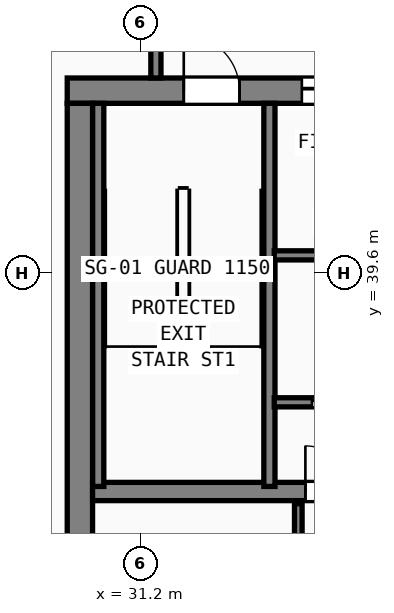
"""IFC4 building model, lengths in metres.
Left out: names, types, materials, properties, quantities, classifications, styles, units other than length and angle.
Written with IfcOpenShell. Run it as: python <this file> out.ifc"""

import sys

from ifc_helpers import new_model, si_unit, direction, frame, frame_2d, origin, place, context, subcontext, project, spatial, rectangle, extrude, element, fill, save


model = new_model("IFC4")
c1 = context("Model", 3, precision=1e-05, world=origin(), true_north=direction((0.0, 1.0)))
c2 = subcontext(c1, "Body", "Model", "MODEL_VIEW")
j1 = project(units=[si_unit("LENGTHUNIT", "METRE"), si_unit("PLANEANGLEUNIT", "RADIAN")], contexts=[c1])
p1 = place(None, origin())
s1 = spatial("IfcSite", under=j1, at=p1, CompositionType="ELEMENT")
p2 = place(p1, origin())
s2 = spatial("IfcBuilding", under=s1, at=p2, CompositionType="ELEMENT")
p3 = place(p2, frame((0.0, 0.0, 282.2)))
s3 = spatial("IfcBuildingStorey", under=s2, at=p3, CompositionType="ELEMENT", Elevation=282.2)
p4 = place(p3, frame((29.75, 43.2, 0.0), z_axis=(0.0, 0.0, 1.0), x_axis=(1.0, 0.0, 0.0)))
e1 = element("IfcWall", 1, at=p4, inside=s3, PredefinedType="SHEAR", context=c2, shape_type="SweptSolid", body=[
    extrude(rectangle(XDim=17.3, YDim=0.5, at=frame_2d((8.65, 0.0))), origin(), (0.0, 0.0, 1.0), 3.72),
])
p5 = place(p4, frame((2.3, 0.0, 0.0)))
e2 = element("IfcOpeningElement", 2, at=p5, cuts=e1, PredefinedType="OPENING", context=c2, shape_type="SweptSolid", body=[
    extrude(rectangle(XDim=1.1, YDim=2.15, at=frame_2d((0.55, 1.075))), frame((0.0, 0.26, 0.0), z_axis=(0.0, -1.0, 0.0), x_axis=(1.0, 0.0, 0.0)), (0.0, 0.0, 1.0), 0.52),
])
p6 = place(p4, frame((7.41, 0.0, 0.0)))
e3 = element("IfcOpeningElement", 3, at=p6, cuts=e1, PredefinedType="OPENING", context=c2, shape_type="SweptSolid", body=[
    extrude(rectangle(XDim=1.1, YDim=2.15, at=frame_2d((0.55, 1.075))), frame((0.0, 0.26, 0.0), z_axis=(0.0, -1.0, 0.0), x_axis=(1.0, 0.0, 0.0)), (0.0, 0.0, 1.0), 0.52),
])
p7 = place(p4, frame((13.5, 0.0, 0.0)))
e4 = element("IfcOpeningElement", 4, at=p7, cuts=e1, PredefinedType="OPENING", context=c2, shape_type="SweptSolid", body=[
    extrude(rectangle(XDim=1.1, YDim=2.15, at=frame_2d((0.55, 1.075))), frame((0.0, 0.26, 0.0), z_axis=(0.0, -1.0, 0.0), x_axis=(1.0, 0.0, 0.0)), (0.0, 0.0, 1.0), 0.52),
])
p8 = place(p4, frame((4.63, 0.0, 0.0)))
e5 = element("IfcOpeningElement", 5, at=p8, cuts=e1, PredefinedType="OPENING", context=c2, shape_type="SweptSolid", body=[
    extrude(rectangle(XDim=1.1, YDim=2.2, at=frame_2d((0.55, 1.1))), frame((0.0, 0.26, 0.0), z_axis=(0.0, -1.0, 0.0), x_axis=(1.0, 0.0, 0.0)), (0.0, 0.0, 1.0), 0.52),
])
p9 = place(p4, frame((10.99, 0.0, 0.0)))
e6 = element("IfcOpeningElement", 6, at=p9, cuts=e1, PredefinedType="OPENING", context=c2, shape_type="SweptSolid", body=[
    extrude(rectangle(XDim=1.1, YDim=2.2, at=frame_2d((0.55, 1.1))), frame((0.0, 0.26, 0.0), z_axis=(0.0, -1.0, 0.0), x_axis=(1.0, 0.0, 0.0)), (0.0, 0.0, 1.0), 0.52),
])
p10 = place(p3, frame((30.0, 32.8, 0.0), z_axis=(0.0, 0.0, 1.0), x_axis=(0.0, 1.0, 0.0)))
e7 = element("IfcWall", 7, at=p10, inside=s3, PredefinedType="SHEAR", context=c2, shape_type="SweptSolid", body=[
    extrude(rectangle(XDim=10.15, YDim=0.5, at=frame_2d((5.075, 0.0))), origin(), (0.0, 0.0, 1.0), 3.72),
])
p11 = place(p3, frame((30.25, 35.29, 0.0), z_axis=(0.0, 0.0, 1.0), x_axis=(1.0, 0.0, 0.0)))
e8 = element("IfcWall", 8, at=p11, inside=s3, PredefinedType="SHEAR", context=c2, shape_type="SweptSolid", body=[
    extrude(rectangle(XDim=16.3, YDim=0.36, at=frame_2d((8.15, 0.0))), origin(), (0.0, 0.0, 1.0), 3.72),
])
p12 = place(p11, frame((5.1, 0.0, 0.0), z_axis=(0.0, 0.0, 1.0), x_axis=(-1.0, 0.0, 0.0)))
e9 = element("IfcOpeningElement", 9, at=p12, cuts=e8, PredefinedType="OPENING", context=c2, shape_type="SweptSolid", body=[
    extrude(rectangle(XDim=0.9, YDim=2.1, at=frame_2d((0.45, 1.05))), frame((0.0, 0.19, 0.0), z_axis=(0.0, -1.0, 0.0), x_axis=(1.0, 0.0, 0.0)), (0.0, 0.0, 1.0), 0.38),
])
p13 = place(p11, frame((12.16, 0.0, 0.0), z_axis=(0.0, 0.0, 1.0), x_axis=(-1.0, 0.0, 0.0)))
e10 = element("IfcOpeningElement", 10, at=p13, cuts=e8, PredefinedType="OPENING", context=c2, shape_type="SweptSolid", body=[
    extrude(rectangle(XDim=0.9, YDim=2.1, at=frame_2d((0.45, 1.05))), frame((0.0, 0.19, 0.0), z_axis=(0.0, -1.0, 0.0), x_axis=(1.0, 0.0, 0.0)), (0.0, 0.0, 1.0), 0.38),
])
for number, where, z_axis, x_axis in (
    (11, (30.362, 35.39, 0.0), (0.0, 0.0, 1.0), (0.0, 1.0, 0.0)),
    (12, (33.74, 35.39, 0.0), (0.0, 0.0, 1.0), (0.0, 1.0, 0.0)),
):
    element("IfcWall", number, at=place(p3, frame(where, z_axis=z_axis, x_axis=x_axis)), inside=s3, PredefinedType="SHEAR", context=c2, shape_type="SweptSolid", body=[
        extrude(rectangle(XDim=7.56, YDim=0.22, at=frame_2d((3.78, 0.0))), origin(), (0.0, 0.0, 1.0), 3.72),
    ])
p14 = place(p3, frame((31.5, 43.45, 0.0), z_axis=(0.0, 0.0, 1.0), x_axis=(0.0, 1.0, 0.0)))
e13 = element("IfcWall", 13, at=p14, inside=s3, PredefinedType="SOLIDWALL", context=c2, shape_type="SweptSolid", body=[
    extrude(rectangle(XDim=2.445, YDim=0.2, at=frame_2d((1.223, 0.0))), origin(), (0.0, 0.0, 1.0), 3.72),
])
p15 = place(p14, frame((1.8, 0.0, 0.0), z_axis=(0.0, 0.0, 1.0), x_axis=(-1.0, 0.0, 0.0)))
e14 = element("IfcOpeningElement", 14, at=p15, cuts=e13, PredefinedType="OPENING", context=c2, shape_type="SweptSolid", body=[
    extrude(rectangle(XDim=1.1, YDim=2.15, at=frame_2d((0.55, 1.075))), frame((0.0, 0.11, 0.0), z_axis=(0.0, -1.0, 0.0), x_axis=(1.0, 0.0, 0.0)), (0.0, 0.0, 1.0), 0.22),
])
p16 = place(p3, frame((33.835, 39.95, 0.0), z_axis=(0.0, 0.0, 1.0), x_axis=(1.0, 0.0, 0.0)))
e15 = element("IfcWall", 15, at=p16, inside=s3, PredefinedType="SOLIDWALL", context=c2, shape_type="SweptSolid", body=[
    extrude(rectangle(XDim=2.77, YDim=0.18, at=frame_2d((1.385, 0.0))), origin(), (0.0, 0.0, 1.0), 3.72),
])
p17 = place(p3, frame((33.835, 37.05, 0.0), z_axis=(0.0, 0.0, 1.0), x_axis=(1.0, 0.0, 0.0)))
e16 = element("IfcWall", 16, at=p17, inside=s3, PredefinedType="SOLIDWALL", context=c2, shape_type="SweptSolid", body=[
    extrude(rectangle(XDim=2.77, YDim=0.18, at=frame_2d((1.385, 0.0))), origin(), (0.0, 0.0, 1.0), 3.72),
])
p18 = place(p17, frame((1.945, 0.0, 0.0), z_axis=(0.0, 0.0, 1.0), x_axis=(-1.0, 0.0, 0.0)))
e17 = element("IfcOpeningElement", 17, at=p18, cuts=e16, PredefinedType="OPENING", context=c2, shape_type="SweptSolid", body=[
    extrude(rectangle(XDim=1.2, YDim=2.2, at=frame_2d((0.6, 1.1))), frame((0.0, 0.1, 0.0), z_axis=(0.0, -1.0, 0.0), x_axis=(1.0, 0.0, 0.0)), (0.0, 0.0, 1.0), 0.2),
])
p19 = place(p3, frame((34.31, 32.88, 0.0), z_axis=(0.0, 0.0, 1.0), x_axis=(0.0, 1.0, 0.0)))
e18 = element("IfcWall", 18, at=p19, inside=s3, PredefinedType="SOLIDWALL", context=c2, shape_type="SweptSolid", body=[
    extrude(rectangle(XDim=2.17, YDim=0.15, at=frame_2d((1.085, 0.0))), origin(), (0.0, 0.0, 1.0), 3.72),
])
p20 = place(p5, origin())
e19 = element("IfcDoor", 19, at=p20, inside=s3, OperationType="SINGLE_SWING_LEFT", PredefinedType="DOOR", context=c2, shape_type="SweptSolid", body=[
    extrude(rectangle(XDim=1.1, YDim=2.15, at=frame_2d((0.55, 1.075))), frame((0.0, 0.185, 0.0), z_axis=(0.0, -1.0, 0.0), x_axis=(1.0, 0.0, 0.0)), (0.0, 0.0, 1.0), 0.05),
])
fill(e2, e19)
p21 = place(p8, origin())
e20 = element("IfcDoor", 20, at=p21, inside=s3, OperationType="SLIDING_TO_LEFT", PredefinedType="DOOR", context=c2, shape_type="SweptSolid", body=[
    extrude(rectangle(XDim=1.1, YDim=2.2, at=frame_2d((0.55, 1.1))), frame((0.0, 0.185, 0.0), z_axis=(0.0, -1.0, 0.0), x_axis=(1.0, 0.0, 0.0)), (0.0, 0.0, 1.0), 0.05),
])
fill(e5, e20)
p22 = place(p18, origin())
e21 = element("IfcDoor", 21, at=p22, inside=s3, OperationType="SLIDING_TO_RIGHT", PredefinedType="DOOR", context=c2, shape_type="SweptSolid", body=[
    extrude(rectangle(XDim=1.2, YDim=2.2, at=frame_2d((0.6, 1.1))), frame((0.0, 0.025, 0.0), z_axis=(0.0, -1.0, 0.0), x_axis=(1.0, 0.0, 0.0)), (0.0, 0.0, 1.0), 0.05),
])
fill(e17, e21)
p23 = place(p12, origin())
e22 = element("IfcDoor", 22, at=p23, inside=s3, OperationType="SINGLE_SWING_RIGHT", PredefinedType="DOOR", context=c2, shape_type="SweptSolid", body=[
    extrude(rectangle(XDim=0.9, YDim=2.1, at=frame_2d((0.45, 1.05))), frame((0.0, 0.025, 0.0), z_axis=(0.0, -1.0, 0.0), x_axis=(1.0, 0.0, 0.0)), (0.0, 0.0, 1.0), 0.05),
])
fill(e9, e22)
save(model, sys.argv[1])
